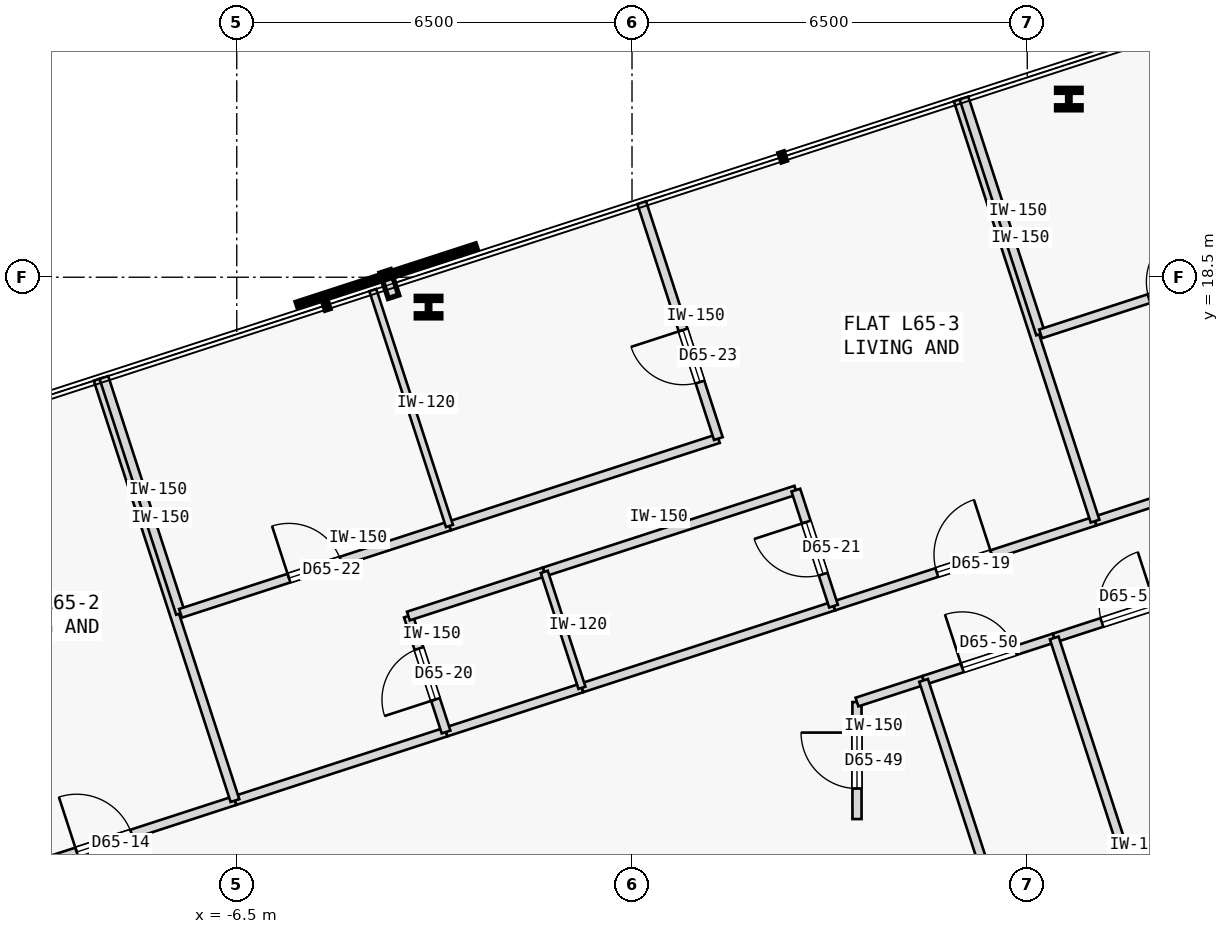
"""IFC4 building model, lengths in metres.
Left out: names, types, materials, properties, quantities, classifications, styles, units other than length and angle.
Written with IfcOpenShell. Run it as: python <this file> out.ifc"""

import sys

from ifc_helpers import new_model, si_unit, direction, frame, frame_2d, origin, origin_2d, place, context, subcontext, project, spatial, rectangle, i_section, extrude, element, fill, save


model = new_model("IFC4")
c1 = context("Model", 3, precision=1e-05, world=origin(), true_north=direction((0.0, 1.0)))
c2 = subcontext(c1, "Body", "Model", "MODEL_VIEW")
j1 = project(units=[si_unit("LENGTHUNIT", "METRE"), si_unit("PLANEANGLEUNIT", "RADIAN")], contexts=[c1])
p1 = place(None, origin())
s1 = spatial("IfcSite", under=j1, at=p1, CompositionType="ELEMENT")
p2 = place(p1, origin())
s2 = spatial("IfcBuilding", under=s1, at=p2, CompositionType="ELEMENT")
p3 = place(p2, frame((0.0, 0.0, 244.4)))
s3 = spatial("IfcBuildingStorey", under=s2, at=p3, CompositionType="ELEMENT", Elevation=244.4)
for number, where, z_axis, x_axis in (
    (1, (7.184, 21.43, 0.0), (0.0, 0.0, 1.0), (1.0, 0.0, 0.0)),
    (2, (-3.346, 18.009, 0.0), (0.0, 0.0, 1.0), (1.0, 0.0, 0.0)),
):
    element("IfcColumn", number, at=place(p3, frame(where, z_axis=z_axis, x_axis=x_axis)), inside=s3, PredefinedType="COLUMN", context=c2, shape_type="SweptSolid", body=[
        extrude(i_section(OverallWidth=0.405, OverallDepth=0.355, WebThickness=0.042, FlangeThickness=0.068, FilletRadius=0.015, at=origin_2d()), origin(), (0.0, 0.0, 1.0), 3.35),
    ])
p4 = place(p3, frame((-10.83, 8.496, 0.0), z_axis=(0.0, 0.0, 1.0), x_axis=(0.951063822327, 0.308994507816, 0.0)))
e3 = element("IfcWall", 3, at=p4, inside=s3, PredefinedType="PARTITIONING", context=c2, shape_type="SweptSolid", body=[
    extrude(rectangle(XDim=4.522, YDim=0.15, at=frame_2d((2.261, 0.0))), origin(), (0.0, 0.0, 1.0), 3.125),
])
p5 = place(p4, frame((1.786, 0.0, 0.0)))
e4 = element("IfcOpeningElement", 4, at=p5, cuts=e3, PredefinedType="OPENING", context=c2, shape_type="SweptSolid", body=[
    extrude(rectangle(XDim=0.95, YDim=2.15, at=frame_2d((0.475, 1.075))), frame((0.0, 0.085, 0.0), z_axis=(0.0, -1.0, 0.0), x_axis=(1.0, 0.0, 0.0)), (0.0, 0.0, 1.0), 0.17),
])
p6 = place(p3, frame((-6.53, 9.894, 0.0), z_axis=(0.0, 0.0, 1.0), x_axis=(0.951057168147, 0.309014988174, 0.0)))
e5 = element("IfcWall", 5, at=p6, inside=s3, PredefinedType="PARTITIONING", context=c2, shape_type="SweptSolid", body=[
    extrude(rectangle(XDim=3.65, YDim=0.15, at=frame_2d((1.825, 0.0))), origin(), (0.0, 0.0, 1.0), 3.125),
])
p7 = place(p3, frame((3.314, 13.092, 0.0), z_axis=(0.0, 0.0, 1.0), x_axis=(0.951068976929, 0.308978641858, 0.0)))
e6 = element("IfcWall", 6, at=p7, inside=s3, PredefinedType="PARTITIONING", context=c2, shape_type="SweptSolid", body=[
    extrude(rectangle(XDim=4.522, YDim=0.15, at=frame_2d((2.261, 0.0))), origin(), (0.0, 0.0, 1.0), 3.125),
])
p8 = place(p7, frame((1.786, 0.0, 0.0)))
e7 = element("IfcOpeningElement", 7, at=p8, cuts=e6, PredefinedType="OPENING", context=c2, shape_type="SweptSolid", body=[
    extrude(rectangle(XDim=0.95, YDim=2.15, at=frame_2d((0.475, 1.075))), frame((0.0, 0.085, 0.0), z_axis=(0.0, -1.0, 0.0), x_axis=(1.0, 0.0, 0.0)), (0.0, 0.0, 1.0), 0.17),
])
p9 = place(p3, frame((-3.058, 11.021, 0.0), z_axis=(0.0, 0.0, 1.0), x_axis=(0.951045519245, 0.309050837767, 0.0)))
e8 = element("IfcWall", 8, at=p9, inside=s3, PredefinedType="PARTITIONING", context=c2, shape_type="SweptSolid", body=[
    extrude(rectangle(XDim=2.35, YDim=0.15, at=frame_2d((1.175, 0.0))), origin(), (0.0, 0.0, 1.0), 3.125),
])
p10 = place(p3, frame((-0.823, 11.748, 0.0), z_axis=(0.0, 0.0, 1.0), x_axis=(0.951052627573, 0.309028962374, 0.0)))
e9 = element("IfcWall", 9, at=p10, inside=s3, PredefinedType="PARTITIONING", context=c2, shape_type="SweptSolid", body=[
    extrude(rectangle(XDim=4.35, YDim=0.15, at=frame_2d((2.175, 0.0))), origin(), (0.0, 0.0, 1.0), 3.125),
])
p11 = place(p3, frame((7.615, 14.489, 0.0), z_axis=(0.0, 0.0, 1.0), x_axis=(0.951050780541, 0.309034646652, 0.0)))
e10 = element("IfcWall", 10, at=p11, inside=s3, PredefinedType="PARTITIONING", context=c2, shape_type="SweptSolid", body=[
    extrude(rectangle(XDim=3.65, YDim=0.15, at=frame_2d((1.825, 0.0))), origin(), (0.0, 0.0, 1.0), 3.125),
])
p12 = place(p3, frame((3.7, 9.59, 0.0), z_axis=(0.0, 0.0, 1.0), x_axis=(-0.000380662325, 0.999999927548, 0.0)))
e11 = element("IfcWall", 11, at=p12, inside=s3, PredefinedType="PARTITIONING", context=c2, shape_type="SweptSolid", body=[
    extrude(rectangle(XDim=1.924, YDim=0.15, at=frame_2d((0.962, 0.0))), origin(), (0.0, 0.0, 1.0), 3.125),
])
p13 = place(p12, frame((0.502, 0.0, 0.0)))
e12 = element("IfcOpeningElement", 12, at=p13, cuts=e11, PredefinedType="OPENING", context=c2, shape_type="SweptSolid", body=[
    extrude(rectangle(XDim=0.92, YDim=2.15, at=frame_2d((0.46, 1.075))), frame((0.0, 0.085, 0.0), z_axis=(0.0, -1.0, 0.0), x_axis=(1.0, 0.0, 0.0)), (0.0, 0.0, 1.0), 0.17),
])
p14 = place(p3, frame((3.699, 11.514, 0.0), z_axis=(0.0, 0.0, 1.0), x_axis=(0.951071437281, 0.308971068529, 0.0)))
e13 = element("IfcWall", 13, at=p14, inside=s3, PredefinedType="PARTITIONING", context=c2, shape_type="SweptSolid", body=[
    extrude(rectangle(XDim=1.152, YDim=0.15, at=frame_2d((0.576, 0.0))), origin(), (0.0, 0.0, 1.0), 3.125),
])
p15 = place(p3, frame((4.795, 11.87, 0.0), z_axis=(0.0, 0.0, 1.0), x_axis=(0.951065832698, 0.308988319964, 0.0)))
e14 = element("IfcWall", 14, at=p15, inside=s3, PredefinedType="PARTITIONING", context=c2, shape_type="SweptSolid", body=[
    extrude(rectangle(XDim=2.259, YDim=0.15, at=frame_2d((1.129, 0.0))), origin(), (0.0, 0.0, 1.0), 3.125),
])
p16 = place(p15, frame((0.669, 0.0, 0.0)))
e15 = element("IfcOpeningElement", 15, at=p16, cuts=e14, PredefinedType="OPENING", context=c2, shape_type="SweptSolid", body=[
    extrude(rectangle(XDim=0.92, YDim=2.15, at=frame_2d((0.46, 1.075))), frame((0.0, 0.085, 0.0), z_axis=(0.0, -1.0, 0.0), x_axis=(1.0, 0.0, 0.0)), (0.0, 0.0, 1.0), 0.17),
])
p17 = place(p3, frame((6.944, 12.568, 0.0), z_axis=(0.0, 0.0, 1.0), x_axis=(0.951042451835, 0.309060276981, 0.0)))
e16 = element("IfcWall", 16, at=p17, inside=s3, PredefinedType="PARTITIONING", context=c2, shape_type="SweptSolid", body=[
    extrude(rectangle(XDim=2.568, YDim=0.15, at=frame_2d((1.284, 0.0))), origin(), (0.0, 0.0, 1.0), 3.125),
])
p18 = place(p17, frame((0.824, 0.0, 0.0)))
e17 = element("IfcOpeningElement", 17, at=p18, cuts=e16, PredefinedType="OPENING", context=c2, shape_type="SweptSolid", body=[
    extrude(rectangle(XDim=0.92, YDim=2.15, at=frame_2d((0.46, 1.075))), frame((0.0, 0.085, 0.0), z_axis=(0.0, -1.0, 0.0), x_axis=(1.0, 0.0, 0.0)), (0.0, 0.0, 1.0), 0.17),
])
p19 = place(p3, frame((-6.53, 9.894, 0.0), z_axis=(0.0, 0.0, 1.0), x_axis=(-0.308998913866, 0.951062390819, 0.0)))
e18 = element("IfcWall", 18, at=p19, inside=s3, PredefinedType="PARTITIONING", context=c2, shape_type="SweptSolid", body=[
    extrude(rectangle(XDim=7.284, YDim=0.15, at=frame_2d((3.642, 0.0))), origin(), (0.0, 0.0, 1.0), 3.125),
])
p20 = place(p3, frame((-3.058, 11.021, 0.0), z_axis=(0.0, 0.0, 1.0), x_axis=(-0.309022749039, 0.951054646472, 0.0)))
e19 = element("IfcWall", 19, at=p20, inside=s3, PredefinedType="PARTITIONING", context=c2, shape_type="SweptSolid", body=[
    extrude(rectangle(XDim=2.005, YDim=0.15, at=frame_2d((1.002, 0.0))), origin(), (0.0, 0.0, 1.0), 3.125),
])
p21 = place(p20, frame((0.562, 0.0, 0.0)))
e20 = element("IfcOpeningElement", 20, at=p21, cuts=e19, PredefinedType="OPENING", context=c2, shape_type="SweptSolid", body=[
    extrude(rectangle(XDim=0.88, YDim=2.15, at=frame_2d((0.44, 1.075))), frame((0.0, 0.085, 0.0), z_axis=(0.0, -1.0, 0.0), x_axis=(1.0, 0.0, 0.0)), (0.0, 0.0, 1.0), 0.17),
])
p22 = place(p3, frame((-3.678, 12.928, 0.0), z_axis=(0.0, 0.0, 1.0), x_axis=(0.951076048914, 0.308956872689, 0.0)))
e21 = element("IfcWall", 21, at=p22, inside=s3, PredefinedType="PARTITIONING", context=c2, shape_type="SweptSolid", body=[
    extrude(rectangle(XDim=2.35, YDim=0.15, at=frame_2d((1.175, 0.0))), origin(), (0.0, 0.0, 1.0), 3.125),
])
p23 = place(p3, frame((-1.443, 13.655, 0.0), z_axis=(0.0, 0.0, 1.0), x_axis=(0.951052627573, 0.309028962374, 0.0)))
e22 = element("IfcWall", 22, at=p23, inside=s3, PredefinedType="PARTITIONING", context=c2, shape_type="SweptSolid", body=[
    extrude(rectangle(XDim=4.35, YDim=0.15, at=frame_2d((2.175, 0.0))), origin(), (0.0, 0.0, 1.0), 3.125),
])
p24 = place(p3, frame((3.314, 13.092, 0.0), z_axis=(0.0, 0.0, 1.0), x_axis=(-0.309058537449, 0.951043017129, 0.0)))
e23 = element("IfcWall", 23, at=p24, inside=s3, PredefinedType="PARTITIONING", context=c2, shape_type="SweptSolid", body=[
    extrude(rectangle(XDim=2.005, YDim=0.15, at=frame_2d((1.002, 0.0))), origin(), (0.0, 0.0, 1.0), 3.125),
])
p25 = place(p24, frame((0.552, 0.0, 0.0)))
e24 = element("IfcOpeningElement", 24, at=p25, cuts=e23, PredefinedType="OPENING", context=c2, shape_type="SweptSolid", body=[
    extrude(rectangle(XDim=0.9, YDim=2.15, at=frame_2d((0.45, 1.075))), frame((0.0, 0.085, 0.0), z_axis=(0.0, -1.0, 0.0), x_axis=(1.0, 0.0, 0.0)), (0.0, 0.0, 1.0), 0.17),
])
p26 = place(p3, frame((-7.425, 12.973, 0.0), z_axis=(0.0, 0.0, 1.0), x_axis=(-0.309018403393, 0.951056058476, 0.0)))
e25 = element("IfcWall", 25, at=p26, inside=s3, PredefinedType="PARTITIONING", context=c2, shape_type="SweptSolid", body=[
    extrude(rectangle(XDim=4.079, YDim=0.15, at=frame_2d((2.04, 0.0))), origin(), (0.0, 0.0, 1.0), 3.125),
])
p27 = place(p3, frame((-7.425, 12.973, 0.0), z_axis=(0.0, 0.0, 1.0), x_axis=(0.951055286502, 0.309020779263, 0.0)))
e26 = element("IfcWall", 26, at=p27, inside=s3, PredefinedType="PARTITIONING", context=c2, shape_type="SweptSolid", body=[
    extrude(rectangle(XDim=4.65, YDim=0.15, at=frame_2d((2.325, 0.0))), origin(), (0.0, 0.0, 1.0), 3.125),
])
p28 = place(p27, frame((1.875, 0.0, 0.0)))
e27 = element("IfcOpeningElement", 27, at=p28, cuts=e26, PredefinedType="OPENING", context=c2, shape_type="SweptSolid", body=[
    extrude(rectangle(XDim=0.9, YDim=2.15, at=frame_2d((0.45, 1.075))), frame((0.0, 0.085, 0.0), z_axis=(0.0, -1.0, 0.0), x_axis=(1.0, 0.0, 0.0)), (0.0, 0.0, 1.0), 0.17),
])
p29 = place(p3, frame((-3.002, 14.41, 0.0), z_axis=(0.0, 0.0, 1.0), x_axis=(0.951065702951, 0.308988719326, 0.0)))
e28 = element("IfcWall", 28, at=p29, inside=s3, PredefinedType="PARTITIONING", context=c2, shape_type="SweptSolid", body=[
    extrude(rectangle(XDim=4.65, YDim=0.15, at=frame_2d((2.325, 0.0))), origin(), (0.0, 0.0, 1.0), 3.125),
])
p30 = place(p3, frame((1.42, 15.846, 0.0), z_axis=(0.0, 0.0, 1.0), x_axis=(-0.309018403393, 0.951056058476, 0.0)))
e29 = element("IfcWall", 29, at=p30, inside=s3, PredefinedType="PARTITIONING", context=c2, shape_type="SweptSolid", body=[
    extrude(rectangle(XDim=4.079, YDim=0.15, at=frame_2d((2.04, 0.0))), origin(), (0.0, 0.0, 1.0), 3.125),
])
p31 = place(p30, frame((0.978, 0.0, 0.0)))
e30 = element("IfcOpeningElement", 30, at=p31, cuts=e29, PredefinedType="OPENING", context=c2, shape_type="SweptSolid", body=[
    extrude(rectangle(XDim=0.9, YDim=2.15, at=frame_2d((0.45, 1.075))), frame((0.0, 0.085, 0.0), z_axis=(0.0, -1.0, 0.0), x_axis=(1.0, 0.0, 0.0)), (0.0, 0.0, 1.0), 0.17),
])
p32 = place(p3, frame((7.615, 14.489, 0.0), z_axis=(0.0, 0.0, 1.0), x_axis=(-0.309029230739, 0.951052540372, 0.0)))
e31 = element("IfcWall", 31, at=p32, inside=s3, PredefinedType="PARTITIONING", context=c2, shape_type="SweptSolid", body=[
    extrude(rectangle(XDim=7.284, YDim=0.15, at=frame_2d((3.642, 0.0))), origin(), (0.0, 0.0, 1.0), 3.125),
])
p33 = place(p3, frame((-0.823, 11.748, 0.0), z_axis=(0.0, 0.0, 1.0), x_axis=(-0.309058537449, 0.951043017129, 0.0)))
e32 = element("IfcWall", 32, at=p33, inside=s3, PredefinedType="PARTITIONING", context=c2, shape_type="SweptSolid", body=[
    extrude(rectangle(XDim=2.005, YDim=0.12, at=frame_2d((1.002, 0.0))), origin(), (0.0, 0.0, 1.0), 3.125),
])
p34 = place(p3, frame((-3.002, 14.41, 0.0), z_axis=(0.0, 0.0, 1.0), x_axis=(-0.309018403393, 0.951056058476, 0.0)))
e33 = element("IfcWall", 33, at=p34, inside=s3, PredefinedType="PARTITIONING", context=c2, shape_type="SweptSolid", body=[
    extrude(rectangle(XDim=4.079, YDim=0.12, at=frame_2d((2.04, 0.0))), origin(), (0.0, 0.0, 1.0), 3.125),
])
p35 = place(p3, frame((6.719, 17.568, 0.0), z_axis=(0.0, 0.0, 1.0), x_axis=(-0.309018403393, 0.951056058476, 0.0)))
e34 = element("IfcWall", 34, at=p35, inside=s3, PredefinedType="PARTITIONING", context=c2, shape_type="SweptSolid", body=[
    extrude(rectangle(XDim=4.079, YDim=0.15, at=frame_2d((2.04, 0.0))), origin(), (0.0, 0.0, 1.0), 3.125),
])
p36 = place(p3, frame((6.719, 17.568, 0.0), z_axis=(0.0, 0.0, 1.0), x_axis=(0.951050272606, 0.309036209813, 0.0)))
e35 = element("IfcWall", 35, at=p36, inside=s3, PredefinedType="PARTITIONING", context=c2, shape_type="SweptSolid", body=[
    extrude(rectangle(XDim=4.65, YDim=0.15, at=frame_2d((2.325, 0.0))), origin(), (0.0, 0.0, 1.0), 3.125),
])
p37 = place(p36, frame((1.875, 0.0, 0.0)))
e36 = element("IfcOpeningElement", 36, at=p37, cuts=e35, PredefinedType="OPENING", context=c2, shape_type="SweptSolid", body=[
    extrude(rectangle(XDim=0.9, YDim=2.15, at=frame_2d((0.45, 1.075))), frame((0.0, 0.085, 0.0), z_axis=(0.0, -1.0, 0.0), x_axis=(1.0, 0.0, 0.0)), (0.0, 0.0, 1.0), 0.17),
])
p38 = place(p3, frame((6.833, 5.6, 0.0), z_axis=(0.0, 0.0, 1.0), x_axis=(-0.309019923183, 0.951055564663, 0.0)))
e37 = element("IfcWall", 37, at=p38, inside=s3, PredefinedType="PARTITIONING", context=c2, shape_type="SweptSolid", body=[
    extrude(rectangle(XDim=6.593, YDim=0.15, at=frame_2d((3.296, 0.0))), origin(), (0.0, 0.0, 1.0), 2.675),
])
p39 = place(p3, frame((9.208, 5.6, 0.0), z_axis=(0.0, 0.0, 1.0), x_axis=(-0.309021275068, 0.951055125403, 0.0)))
e38 = element("IfcWall", 38, at=p39, inside=s3, PredefinedType="PARTITIONING", context=c2, shape_type="SweptSolid", body=[
    extrude(rectangle(XDim=7.327, YDim=0.15, at=frame_2d((3.664, 0.0))), origin(), (0.0, 0.0, 1.0), 3.125),
])
p40 = place(p5, origin())
e39 = element("IfcDoor", 39, at=p40, inside=s3, OperationType="SINGLE_SWING_LEFT", PredefinedType="DOOR", context=c2, shape_type="SweptSolid", body=[
    extrude(rectangle(XDim=0.95, YDim=2.15, at=frame_2d((0.475, 1.075))), frame((0.0, 0.025, 0.0), z_axis=(0.0, -1.0, 0.0), x_axis=(1.0, 0.0, 0.0)), (0.0, 0.0, 1.0), 0.05),
])
fill(e4, e39)
p41 = place(p8, origin())
e40 = element("IfcDoor", 40, at=p41, inside=s3, OperationType="SINGLE_SWING_RIGHT", PredefinedType="DOOR", context=c2, shape_type="SweptSolid", body=[
    extrude(rectangle(XDim=0.95, YDim=2.15, at=frame_2d((0.475, 1.075))), frame((0.0, 0.025, 0.0), z_axis=(0.0, -1.0, 0.0), x_axis=(1.0, 0.0, 0.0)), (0.0, 0.0, 1.0), 0.05),
])
fill(e7, e40)
p42 = place(p21, origin())
e41 = element("IfcDoor", 41, at=p42, inside=s3, OperationType="SINGLE_SWING_LEFT", PredefinedType="DOOR", context=c2, shape_type="SweptSolid", body=[
    extrude(rectangle(XDim=0.88, YDim=2.15, at=frame_2d((0.44, 1.075))), frame((0.0, 0.025, 0.0), z_axis=(0.0, -1.0, 0.0), x_axis=(1.0, 0.0, 0.0)), (0.0, 0.0, 1.0), 0.05),
])
fill(e20, e41)
p43 = place(p25, origin())
e42 = element("IfcDoor", 42, at=p43, inside=s3, OperationType="SINGLE_SWING_RIGHT", PredefinedType="DOOR", context=c2, shape_type="SweptSolid", body=[
    extrude(rectangle(XDim=0.9, YDim=2.15, at=frame_2d((0.45, 1.075))), frame((0.0, 0.025, 0.0), z_axis=(0.0, -1.0, 0.0), x_axis=(1.0, 0.0, 0.0)), (0.0, 0.0, 1.0), 0.05),
])
fill(e24, e42)
p44 = place(p28, origin())
e43 = element("IfcDoor", 43, at=p44, inside=s3, OperationType="SINGLE_SWING_LEFT", PredefinedType="DOOR", context=c2, shape_type="SweptSolid", body=[
    extrude(rectangle(XDim=0.9, YDim=2.15, at=frame_2d((0.45, 1.075))), frame((0.0, 0.025, 0.0), z_axis=(0.0, -1.0, 0.0), x_axis=(1.0, 0.0, 0.0)), (0.0, 0.0, 1.0), 0.05),
])
fill(e27, e43)
p45 = place(p31, origin())
e44 = element("IfcDoor", 44, at=p45, inside=s3, OperationType="SINGLE_SWING_RIGHT", PredefinedType="DOOR", context=c2, shape_type="SweptSolid", body=[
    extrude(rectangle(XDim=0.9, YDim=2.15, at=frame_2d((0.45, 1.075))), frame((0.0, 0.025, 0.0), z_axis=(0.0, -1.0, 0.0), x_axis=(1.0, 0.0, 0.0)), (0.0, 0.0, 1.0), 0.05),
])
fill(e30, e44)
p46 = place(p37, origin())
e45 = element("IfcDoor", 45, at=p46, inside=s3, OperationType="SINGLE_SWING_RIGHT", PredefinedType="DOOR", context=c2, shape_type="SweptSolid", body=[
    extrude(rectangle(XDim=0.9, YDim=2.15, at=frame_2d((0.45, 1.075))), frame((0.0, 0.025, 0.0), z_axis=(0.0, -1.0, 0.0), x_axis=(1.0, 0.0, 0.0)), (0.0, 0.0, 1.0), 0.05),
])
fill(e36, e45)
p47 = place(p13, origin())
e46 = element("IfcDoor", 46, at=p47, inside=s3, OperationType="SINGLE_SWING_RIGHT", PredefinedType="DOOR", context=c2, shape_type="SweptSolid", body=[
    extrude(rectangle(XDim=0.92, YDim=2.15, at=frame_2d((0.46, 1.075))), frame((0.0, 0.025, 0.0), z_axis=(0.0, -1.0, 0.0), x_axis=(1.0, 0.0, 0.0)), (0.0, 0.0, 1.0), 0.05),
])
fill(e12, e46)
p48 = place(p16, origin())
e47 = element("IfcDoor", 47, at=p48, inside=s3, OperationType="SINGLE_SWING_LEFT", PredefinedType="DOOR", context=c2, shape_type="SweptSolid", body=[
    extrude(rectangle(XDim=0.92, YDim=2.15, at=frame_2d((0.46, 1.075))), frame((0.0, 0.025, 0.0), z_axis=(0.0, -1.0, 0.0), x_axis=(1.0, 0.0, 0.0)), (0.0, 0.0, 1.0), 0.05),
])
fill(e15, e47)
p49 = place(p18, origin())
e48 = element("IfcDoor", 48, at=p49, inside=s3, OperationType="SINGLE_SWING_RIGHT", PredefinedType="DOOR", context=c2, shape_type="SweptSolid", body=[
    extrude(rectangle(XDim=0.92, YDim=2.15, at=frame_2d((0.46, 1.075))), frame((0.0, 0.025, 0.0), z_axis=(0.0, -1.0, 0.0), x_axis=(1.0, 0.0, 0.0)), (0.0, 0.0, 1.0), 0.05),
])
fill(e17, e48)
save(model, sys.argv[1])
